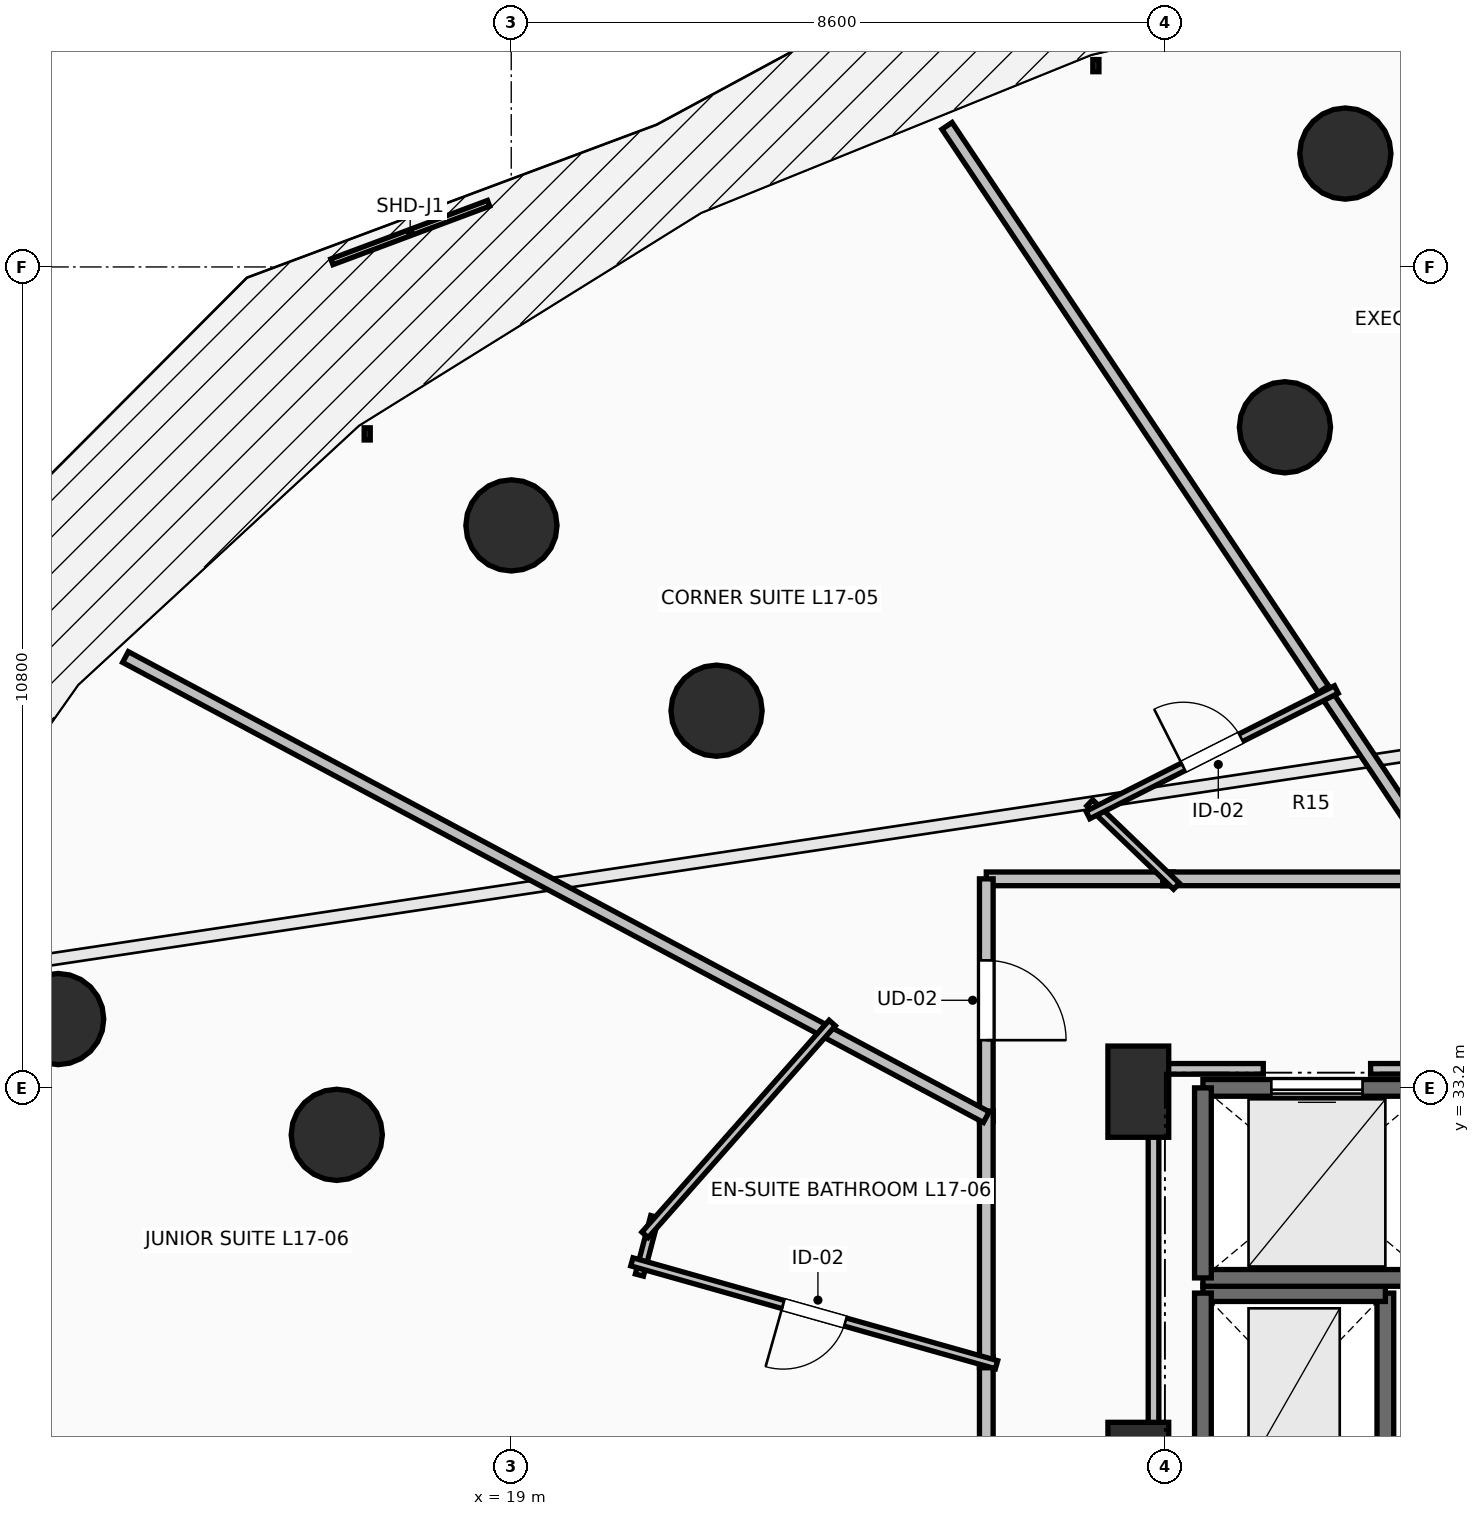
"""IFC4 building model, lengths in metres.
Left out: names, types, materials, properties, quantities, classifications, styles, units other than length and angle.
Written with IfcOpenShell. Run it as: python <this file> out.ifc"""

import sys

from ifc_helpers import new_model, si_unit, direction, frame, frame_2d, origin, origin_2d, place, context, subcontext, project, spatial, rectangle, circle, extrude, element, fill, save


model = new_model("IFC4")
c1 = context("Model", 3, precision=1e-05, world=origin(), true_north=direction((0.0, 1.0)))
c2 = subcontext(c1, "Body", "Model", "MODEL_VIEW")
j1 = project(units=[si_unit("LENGTHUNIT", "METRE"), si_unit("PLANEANGLEUNIT", "RADIAN")], contexts=[c1])
p1 = place(None, origin())
s1 = spatial("IfcSite", under=j1, at=p1, CompositionType="ELEMENT")
p2 = place(p1, origin())
s2 = spatial("IfcBuilding", under=s1, at=p2, CompositionType="ELEMENT")
p3 = place(p2, frame((0.0, 0.0, 66.0)))
s3 = spatial("IfcBuildingStorey", under=s2, at=p3, CompositionType="ELEMENT", Elevation=66.0)
for number, where, z_axis, x_axis in (
    (1, (29.179, 41.891, 0.0), (0.0, 0.0, 1.0), (-0.383, 0.924, 0.0)),
    (2, (21.701, 38.162, 0.0), (0.0, 0.0, 1.0), (-0.707, 0.707, 0.0)),
    (3, (16.705, 32.582, 0.0), (0.0, 0.0, 1.0), (-0.924, 0.383, 0.0)),
    (4, (29.974, 45.492, 0.0), (0.0, 0.0, 1.0), (-0.383, 0.924, 0.0)),
    (5, (19.003, 40.6, 0.0), (0.0, 0.0, 1.0), (-0.707, 0.707, 0.0)),
    (6, (13.039, 34.105, 0.0), (0.0, 0.0, 1.0), (-0.924, 0.383, 0.0)),
):
    element("IfcColumn", number, at=place(p3, frame(where, z_axis=z_axis, x_axis=x_axis)), inside=s3, PredefinedType="COLUMN", context=c2, shape_type="SweptSolid", body=[
        extrude(circle(Radius=0.6, at=origin_2d()), origin(), (0.0, 0.0, 1.0), 3.5),
    ])
for number, where, z_axis, x_axis in (
    (7, (27.25, 28.2, 0.0), (0.0, 0.0, 1.0), (1.0, 0.0, 0.0)),
    (8, (27.25, 33.15, 0.0), (0.0, 0.0, 1.0), (1.0, 0.0, 0.0)),
):
    element("IfcColumn", number, at=place(p3, frame(where, z_axis=z_axis, x_axis=x_axis)), inside=s3, PredefinedType="PILASTER", context=c2, shape_type="SweptSolid", body=[
        extrude(rectangle(XDim=0.8, YDim=1.2, at=origin_2d()), origin(), (0.0, 0.0, 1.0), 3.5),
    ])
p4 = place(p3, frame((30.5, 28.0, 0.0), z_axis=(0.0, 0.0, 1.0), x_axis=(0.0, 1.0, 0.0)))
e9 = element("IfcWall", 9, at=p4, inside=s3, PredefinedType="SHEAR", context=c2, shape_type="SweptSolid", body=[
    extrude(rectangle(XDim=2.5, YDim=0.22, at=frame_2d((1.25, 0.0))), origin(), (0.0, 0.0, 1.0), 3.15),
])
p5 = place(p3, frame((30.5, 30.5, 0.0), z_axis=(0.0, 0.0, 1.0), x_axis=(-1.0, 0.0, 0.0)))
e10 = element("IfcWall", 10, at=p5, inside=s3, PredefinedType="SHEAR", context=c2, shape_type="SweptSolid", body=[
    extrude(rectangle(XDim=2.4, YDim=0.22, at=frame_2d((1.2, 0.0))), origin(), (0.0, 0.0, 1.0), 3.15),
])
p6 = place(p3, frame((28.1, 30.5, 0.0), z_axis=(0.0, 0.0, 1.0), x_axis=(0.0, -1.0, 0.0)))
e11 = element("IfcWall", 11, at=p6, inside=s3, PredefinedType="SHEAR", context=c2, shape_type="SweptSolid", body=[
    extrude(rectangle(XDim=2.5, YDim=0.22, at=frame_2d((1.25, 0.0))), origin(), (0.0, 0.0, 1.0), 3.15),
])
p7 = place(p3, frame((28.1, 30.7, 0.0), z_axis=(0.0, 0.0, 1.0), x_axis=(1.0, 0.0, 0.0)))
e12 = element("IfcWall", 12, at=p7, inside=s3, PredefinedType="SOLIDWALL", context=c2, shape_type="SweptSolid", body=[
    extrude(rectangle(XDim=3.0, YDim=0.22, at=frame_2d((1.5, 0.0))), origin(), (0.0, 0.0, 1.0), 3.15),
])
p8 = place(p3, frame((31.1, 33.2, 0.0), z_axis=(0.0, 0.0, 1.0), x_axis=(-1.0, 0.0, 0.0)))
e13 = element("IfcWall", 13, at=p8, inside=s3, PredefinedType="SOLIDWALL", context=c2, shape_type="SweptSolid", body=[
    extrude(rectangle(XDim=3.0, YDim=0.22, at=frame_2d((1.5, 0.0))), origin(), (0.0, 0.0, 1.0), 3.15),
])
p9 = place(p8, frame((0.9, 0.0, 0.0)))
e14 = element("IfcOpeningElement", 14, at=p9, cuts=e13, PredefinedType="OPENING", context=c2, shape_type="SweptSolid", body=[
    extrude(rectangle(XDim=1.2, YDim=2.2, at=frame_2d((0.6, 1.1))), frame((0.0, 0.125, 0.0), z_axis=(0.0, -1.0, 0.0), x_axis=(1.0, 0.0, 0.0)), (0.0, 0.0, 1.0), 0.25),
])
p10 = place(p3, frame((28.1, 33.2, 0.0), z_axis=(0.0, 0.0, 1.0), x_axis=(0.0, -1.0, 0.0)))
e15 = element("IfcWall", 15, at=p10, inside=s3, PredefinedType="SOLIDWALL", context=c2, shape_type="SweptSolid", body=[
    extrude(rectangle(XDim=2.5, YDim=0.22, at=frame_2d((1.25, 0.0))), origin(), (0.0, 0.0, 1.0), 3.15),
])
p11 = place(p3, frame((27.711, 35.95, 0.0), z_axis=(0.0, 0.0, 1.0), x_axis=(-1.0, 0.0, 0.0)))
e16 = element("IfcWall", 16, at=p11, inside=s3, PredefinedType="PARTITIONING", context=c2, shape_type="SweptSolid", body=[
    extrude(rectangle(XDim=2.461, YDim=0.18, at=frame_2d((1.23, 0.0))), origin(), (0.0, 0.0, 1.0), 2.342),
])
p12 = place(p3, frame((25.25, 35.95, 0.0), z_axis=(0.0, 0.0, 1.0), x_axis=(0.0, -1.0, 0.0)))
e17 = element("IfcWall", 17, at=p12, inside=s3, PredefinedType="PARTITIONING", context=c2, shape_type="SweptSolid", body=[
    extrude(rectangle(XDim=3.195, YDim=0.18, at=frame_2d((1.598, 0.0))), origin(), (0.0, 0.0, 1.0), 2.342),
])
p13 = place(p12, frame((1.073, 0.0, 0.0)))
e18 = element("IfcOpeningElement", 18, at=p13, cuts=e17, PredefinedType="OPENING", context=c2, shape_type="SweptSolid", body=[
    extrude(rectangle(XDim=1.05, YDim=2.2, at=frame_2d((0.525, 1.1))), frame((0.0, 0.105, 0.0), z_axis=(0.0, -1.0, 0.0), x_axis=(1.0, 0.0, 0.0)), (0.0, 0.0, 1.0), 0.21),
])
p14 = place(p3, frame((31.42, 35.95, 0.0), z_axis=(0.0, 0.0, 1.0), x_axis=(-1.0, 0.0, 0.0)))
e19 = element("IfcWall", 19, at=p14, inside=s3, PredefinedType="PARTITIONING", context=c2, shape_type="SweptSolid", body=[
    extrude(rectangle(XDim=3.849, YDim=0.18, at=frame_2d((1.924, 0.0))), origin(), (0.0, 0.0, 1.0), 2.342),
])
p15 = place(p3, frame((25.25, 29.658, 0.0), z_axis=(0.0, 0.0, 1.0), x_axis=(0.0, -1.0, 0.0)))
e20 = element("IfcWall", 20, at=p15, inside=s3, PredefinedType="PARTITIONING", context=c2, shape_type="SweptSolid", body=[
    extrude(rectangle(XDim=3.718, YDim=0.18, at=frame_2d((1.859, 0.0))), origin(), (0.0, 0.0, 1.0), 2.342),
])
p16 = place(p15, frame((1.334, 0.0, 0.0)))
e21 = element("IfcOpeningElement", 21, at=p16, cuts=e20, PredefinedType="OPENING", context=c2, shape_type="SweptSolid", body=[
    extrude(rectangle(XDim=1.05, YDim=2.2, at=frame_2d((0.525, 1.1))), frame((0.0, 0.105, 0.0), z_axis=(0.0, -1.0, 0.0), x_axis=(1.0, 0.0, 0.0)), (0.0, 0.0, 1.0), 0.21),
])
p17 = place(p3, frame((25.25, 32.895, 0.0), z_axis=(0.0, 0.0, 1.0), x_axis=(0.0, -1.0, 0.0)))
e22 = element("IfcWall", 22, at=p17, inside=s3, PredefinedType="PARTITIONING", context=c2, shape_type="SweptSolid", body=[
    extrude(rectangle(XDim=3.377, YDim=0.18, at=frame_2d((1.688, 0.0))), origin(), (0.0, 0.0, 1.0), 3.15),
])
p18 = place(p3, frame((24.733, 45.856, 0.0), z_axis=(0.0, 0.0, 1.0), x_axis=(0.555564858458, -0.831473203444, 0.0)))
e23 = element("IfcWall", 23, at=p18, inside=s3, PredefinedType="PARTITIONING", context=c2, shape_type="SweptSolid", body=[
    extrude(rectangle(XDim=9.054, YDim=0.16, at=frame_2d((4.527, 0.0))), origin(), (0.0, 0.0, 1.0), 2.342),
])
p19 = place(p3, frame((29.685, 38.444, 0.0), z_axis=(0.0, 0.0, 1.0), x_axis=(0.555596981897, -0.831451738652, 0.0)))
e24 = element("IfcWall", 24, at=p19, inside=s3, PredefinedType="PARTITIONING", context=c2, shape_type="SweptSolid", body=[
    extrude(rectangle(XDim=3.14, YDim=0.16, at=frame_2d((1.57, 0.0))), origin(), (0.0, 0.0, 1.0), 2.342),
])
p20 = place(p3, frame((27.752, 35.853, 0.0), z_axis=(0.0, 0.0, 1.0), x_axis=(-0.720853814296, 0.693087136236, 0.0)))
e25 = element("IfcWall", 25, at=p20, inside=s3, PredefinedType="PARTITIONING", context=c2, shape_type="SweptSolid", body=[
    extrude(rectangle(XDim=1.583, YDim=0.11, at=frame_2d((0.792, 0.0))), origin(), (0.0, 0.0, 1.0), 2.342),
])
p21 = place(p3, frame((26.587, 36.79, 0.0), z_axis=(0.0, 0.0, 1.0), x_axis=(0.892525573298, 0.450996786029, 0.0)))
e26 = element("IfcWall", 26, at=p21, inside=s3, PredefinedType="PARTITIONING", context=c2, shape_type="SweptSolid", body=[
    extrude(rectangle(XDim=3.662, YDim=0.11, at=frame_2d((1.831, 0.0))), origin(), (0.0, 0.0, 1.0), 2.342),
])
p22 = place(p21, frame((1.406, 0.0, 0.0)))
e27 = element("IfcOpeningElement", 27, at=p22, cuts=e26, PredefinedType="OPENING", context=c2, shape_type="SweptSolid", body=[
    extrude(rectangle(XDim=0.85, YDim=2.1, at=frame_2d((0.425, 1.05))), frame((0.0, 0.07, 0.0), z_axis=(0.0, -1.0, 0.0), x_axis=(1.0, 0.0, 0.0)), (0.0, 0.0, 1.0), 0.14),
])
p23 = place(p3, frame((13.925, 38.868, 0.0), z_axis=(0.0, 0.0, 1.0), x_axis=(0.881932077496, -0.471376506292, 0.0)))
e28 = element("IfcWall", 28, at=p23, inside=s3, PredefinedType="PARTITIONING", context=c2, shape_type="SweptSolid", body=[
    extrude(rectangle(XDim=12.841, YDim=0.16, at=frame_2d((6.42, 0.0))), origin(), (0.0, 0.0, 1.0), 2.534),
])
p24 = place(p3, frame((20.686, 30.738, 0.0), z_axis=(0.0, 0.0, 1.0), x_axis=(0.254583995409, 0.967050665313, 0.0)))
e29 = element("IfcWall", 29, at=p24, inside=s3, PredefinedType="PARTITIONING", context=c2, shape_type="SweptSolid", body=[
    extrude(rectangle(XDim=0.795, YDim=0.11, at=frame_2d((0.397, 0.0))), origin(), (0.0, 0.0, 1.0), 2.342),
])
p25 = place(p3, frame((20.76, 31.266, 0.0), z_axis=(0.0, 0.0, 1.0), x_axis=(0.662136072578, 0.74938362765, 0.0)))
e30 = element("IfcWall", 30, at=p25, inside=s3, PredefinedType="PARTITIONING", context=c2, shape_type="SweptSolid", body=[
    extrude(rectangle(XDim=3.719, YDim=0.11, at=frame_2d((1.859, 0.0))), origin(), (0.0, 0.0, 1.0), 3.15),
])
p26 = place(p3, frame((25.385, 29.558, 0.0), z_axis=(0.0, 0.0, 1.0), x_axis=(-0.962466408657, 0.271400833098, 0.0)))
e31 = element("IfcWall", 31, at=p26, inside=s3, PredefinedType="PARTITIONING", context=c2, shape_type="SweptSolid", body=[
    extrude(rectangle(XDim=4.984, YDim=0.11, at=frame_2d((2.492, 0.0))), origin(), (0.0, 0.0, 1.0), 2.342),
])
p27 = place(p26, frame((2.067, 0.0, 0.0)))
e32 = element("IfcOpeningElement", 32, at=p27, cuts=e31, PredefinedType="OPENING", context=c2, shape_type="SweptSolid", body=[
    extrude(rectangle(XDim=0.85, YDim=2.1, at=frame_2d((0.425, 1.05))), frame((0.0, 0.07, 0.0), z_axis=(0.0, -1.0, 0.0), x_axis=(1.0, 0.0, 0.0)), (0.0, 0.0, 1.0), 0.14),
])
p28 = place(p3, frame((27.45, 28.196, 0.0), z_axis=(0.0, 0.0, 1.0), x_axis=(0.0, 1.0, 0.0)))
e33 = element("IfcWall", 33, at=p28, inside=s3, PredefinedType="PARTITIONING", context=c2, shape_type="SweptSolid", body=[
    extrude(rectangle(XDim=5.254, YDim=0.14, at=frame_2d((2.627, 0.0))), origin(), (0.0, 0.0, 1.0), 2.342),
])
p29 = place(p3, frame((27.45, 33.45, 0.0), z_axis=(0.0, 0.0, 1.0), x_axis=(1.0, 0.0, 0.0)))
e34 = element("IfcWall", 34, at=p29, inside=s3, PredefinedType="PARTITIONING", context=c2, shape_type="SweptSolid", body=[
    extrude(rectangle(XDim=1.444, YDim=0.14, at=frame_2d((0.722, 0.0))), origin(), (0.0, 0.0, 1.0), 2.342),
])
p30 = place(p3, frame((30.306, 33.45, 0.0), z_axis=(0.0, 0.0, 1.0), x_axis=(1.0, 0.0, 0.0)))
e35 = element("IfcWall", 35, at=p30, inside=s3, PredefinedType="PARTITIONING", context=c2, shape_type="SweptSolid", body=[
    extrude(rectangle(XDim=0.674, YDim=0.14, at=frame_2d((0.337, 0.0))), origin(), (0.0, 0.0, 1.0), 3.15),
])
p31 = place(p9, origin())
e36 = element("IfcDoor", 36, at=p31, inside=s3, OperationType="SLIDING_TO_LEFT", PredefinedType="DOOR", context=c2, shape_type="SweptSolid", body=[
    extrude(rectangle(XDim=1.2, YDim=2.2, at=frame_2d((0.6, 1.1))), frame((0.0, 0.025, 0.0), z_axis=(0.0, -1.0, 0.0), x_axis=(1.0, 0.0, 0.0)), (0.0, 0.0, 1.0), 0.05),
])
fill(e14, e36)
p32 = place(p13, origin())
e37 = element("IfcDoor", 37, at=p32, inside=s3, OperationType="SINGLE_SWING_RIGHT", PredefinedType="DOOR", context=c2, shape_type="SweptSolid", body=[
    extrude(rectangle(XDim=1.05, YDim=2.2, at=frame_2d((0.525, 1.1))), frame((0.0, 0.025, 0.0), z_axis=(0.0, -1.0, 0.0), x_axis=(1.0, 0.0, 0.0)), (0.0, 0.0, 1.0), 0.05),
])
fill(e18, e37)
p33 = place(p22, origin())
e38 = element("IfcDoor", 38, at=p33, inside=s3, OperationType="SINGLE_SWING_LEFT", PredefinedType="DOOR", context=c2, shape_type="SweptSolid", body=[
    extrude(rectangle(XDim=0.85, YDim=2.1, at=frame_2d((0.425, 1.05))), frame((0.0, 0.025, 0.0), z_axis=(0.0, -1.0, 0.0), x_axis=(1.0, 0.0, 0.0)), (0.0, 0.0, 1.0), 0.05),
])
fill(e27, e38)
p34 = place(p27, origin())
e39 = element("IfcDoor", 39, at=p34, inside=s3, OperationType="SINGLE_SWING_RIGHT", PredefinedType="DOOR", context=c2, shape_type="SweptSolid", body=[
    extrude(rectangle(XDim=0.85, YDim=2.1, at=frame_2d((0.425, 1.05))), frame((0.0, 0.025, 0.0), z_axis=(0.0, -1.0, 0.0), x_axis=(1.0, 0.0, 0.0)), (0.0, 0.0, 1.0), 0.05),
])
fill(e32, e39)
save(model, sys.argv[1])
